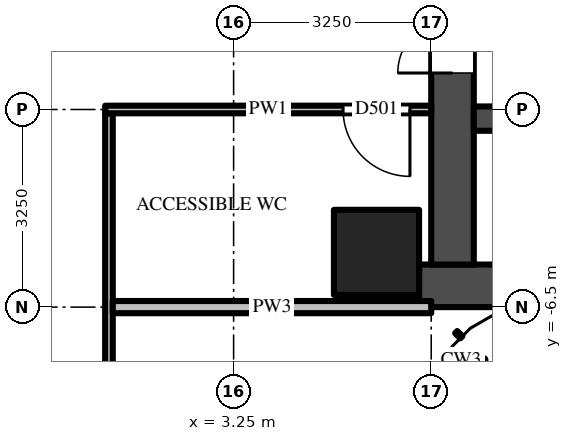
"""IFC4 building model, lengths in metres.
Left out: names, types, materials, properties, quantities, classifications, styles, units other than length and angle.
Written with IfcOpenShell. Run it as: python <this file> out.ifc"""

import sys

from ifc_helpers import new_model, si_unit, direction, frame, frame_2d, origin, origin_2d, place, context, subcontext, project, spatial, rectangle, extrude, source, transform, mapped, element, fill, save


model = new_model("IFC4")
c1 = context("Model", 3, precision=1e-05, world=origin(), true_north=direction((0.0, 1.0)))
c2 = subcontext(c1, "Body", "Model", "MODEL_VIEW")
j1 = project(units=[si_unit("LENGTHUNIT", "METRE"), si_unit("PLANEANGLEUNIT", "RADIAN")], contexts=[c1])
p1 = place(None, origin())
s1 = spatial("IfcSite", under=j1, at=p1, CompositionType="ELEMENT")
p2 = place(p1, origin())
s2 = spatial("IfcBuilding", under=s1, at=p2, CompositionType="ELEMENT")
p3 = place(p2, frame((0.0, 0.0, 83.5)))
s3 = spatial("IfcBuildingStorey", under=s2, at=p3, CompositionType="ELEMENT", Elevation=83.5)
m1 = source(origin(), c2, "Body", "SweptSolid", [
    extrude(rectangle(XDim=1.4, YDim=1.4, at=origin_2d()), origin(), (0.0, 0.0, 1.0), 4.5),
])
p4 = place(p3, frame((5.6, -5.6, 0.0), z_axis=(0.0, 0.0, 1.0), x_axis=(1.0, 0.0, 0.0)))
e1 = element("IfcColumn", 1, at=p4, inside=s3, PredefinedType="COLUMN", context=c2, shape_type="MappedRepresentation", body=[
    mapped(m1, transform((0.0, 0.0, 0.0))),
])
m2 = source(origin(), c2, "Body", "SweptSolid", [
    extrude(rectangle(XDim=16.45, YDim=0.7, at=frame_2d((8.225, 0.0))), origin(), (0.0, 0.0, 1.0), 4.25),
])
p5 = place(p3, frame((6.3, -6.15, 0.0), z_axis=(0.0, 0.0, 1.0), x_axis=(1.0, 0.0, 0.0)))
e2 = element("IfcWall", 2, at=p5, inside=s3, PredefinedType="SHEAR", context=c2, shape_type="MappedRepresentation", body=[
    mapped(m2, transform((0.0, 0.0, 0.0))),
])
m3 = source(origin(), c2, "Body", "SweptSolid", [
    extrude(rectangle(XDim=9.05, YDim=0.7, at=frame_2d((4.525, 0.0))), origin(), (0.0, 0.0, 1.0), 4.25),
])
p6 = place(p3, frame((6.85, -5.8, 0.0), z_axis=(0.0, 0.0, 1.0), x_axis=(0.0, 1.0, 0.0)))
e3 = element("IfcWall", 3, at=p6, inside=s3, PredefinedType="SHEAR", context=c2, shape_type="MappedRepresentation", body=[
    mapped(m3, transform((0.0, 0.0, 0.0))),
])
m4 = source(origin(), c2, "Body", "SweptSolid", [
    extrude(rectangle(XDim=1.8, YDim=2.1, at=frame_2d((0.9, 1.05))), frame((0.0, 0.36, 0.0), z_axis=(0.0, -1.0, 0.0), x_axis=(1.0, 0.0, 0.0)), (0.0, 0.0, 1.0), 0.72),
])
p7 = place(p6, frame((3.15, 0.0, 0.0)))
e4 = element("IfcOpeningElement", 4, at=p7, cuts=e3, PredefinedType="OPENING", context=c2, shape_type="MappedRepresentation", body=[
    mapped(m4, transform((0.0, 0.0, 0.0))),
])
m5 = source(origin(), c2, "Body", "SweptSolid", [
    extrude(rectangle(XDim=7.5, YDim=0.4, at=frame_2d((3.75, 0.0))), origin(), (0.0, 0.0, 1.0), 4.25),
])
p8 = place(p3, frame((7.2, -3.4, 0.0), z_axis=(0.0, 0.0, 1.0), x_axis=(1.0, 0.0, 0.0)))
e5 = element("IfcWall", 5, at=p8, inside=s3, PredefinedType="SHEAR", context=c2, shape_type="MappedRepresentation", body=[
    mapped(m5, transform((0.0, 0.0, 0.0))),
])
m6 = source(origin(), c2, "Body", "SweptSolid", [
    extrude(rectangle(XDim=1.1, YDim=2.1, at=frame_2d((0.55, 1.05))), frame((0.0, 0.21, 0.0), z_axis=(0.0, -1.0, 0.0), x_axis=(1.0, 0.0, 0.0)), (0.0, 0.0, 1.0), 0.42),
])
p9 = place(p8, frame((3.0, 0.0, 0.0)))
e6 = element("IfcOpeningElement", 6, at=p9, cuts=e5, PredefinedType="OPENING", context=c2, shape_type="MappedRepresentation", body=[
    mapped(m6, transform((0.0, 0.0, 0.0))),
])
p10 = place(p8, frame((5.5, 0.0, 0.0)))
e7 = element("IfcOpeningElement", 7, at=p10, cuts=e5, PredefinedType="OPENING", context=c2, shape_type="MappedRepresentation", body=[
    mapped(m6, transform((0.0, 0.0, 0.0))),
])
m7 = source(origin(), c2, "Body", "SweptSolid", [
    extrude(rectangle(XDim=8.725, YDim=0.125, at=frame_2d((4.363, 0.0))), origin(), (0.0, 0.0, 1.0), 3.468),
])
p11 = place(p3, frame((1.2, -3.312, 0.0), z_axis=(0.0, 0.0, 1.0), x_axis=(0.0, -1.0, 0.0)))
e8 = element("IfcWall", 8, at=p11, inside=s3, PredefinedType="PARTITIONING", context=c2, shape_type="MappedRepresentation", body=[
    mapped(m7, transform((0.0, 0.0, 0.0))),
])
m8 = source(origin(), c2, "Body", "SweptSolid", [
    extrude(rectangle(XDim=1.0, YDim=2.1, at=frame_2d((0.5, 1.05))), frame((0.0, 0.073, 0.0), z_axis=(0.0, -1.0, 0.0), x_axis=(1.0, 0.0, 0.0)), (0.0, 0.0, 1.0), 0.145),
])
p12 = place(p11, frame((7.438, 0.0, 0.0)))
e9 = element("IfcOpeningElement", 9, at=p12, cuts=e8, PredefinedType="OPENING", context=c2, shape_type="MappedRepresentation", body=[
    mapped(m8, transform((0.0, 0.0, 0.0))),
])
m9 = source(origin(), c2, "Body", "SweptSolid", [
    extrude(rectangle(XDim=5.238, YDim=0.2, at=frame_2d((2.619, 0.0))), origin(), (0.0, 0.0, 1.0), 3.33),
])
p13 = place(p3, frame((1.262, -6.5, 0.0), z_axis=(0.0, 0.0, 1.0), x_axis=(1.0, 0.0, 0.0)))
e10 = element("IfcWall", 10, at=p13, inside=s3, PredefinedType="PARTITIONING", context=c2, shape_type="MappedRepresentation", body=[
    mapped(m9, transform((0.0, 0.0, 0.0))),
])
m10 = source(origin(), c2, "Body", "SweptSolid", [
    extrude(rectangle(XDim=5.363, YDim=0.125, at=frame_2d((2.681, 0.0))), origin(), (0.0, 0.0, 1.0), 3.468),
])
p14 = place(p3, frame((6.5, -3.25, 0.0), z_axis=(0.0, 0.0, 1.0), x_axis=(-1.0, 0.0, 0.0)))
e11 = element("IfcWall", 11, at=p14, inside=s3, PredefinedType="PARTITIONING", context=c2, shape_type="MappedRepresentation", body=[
    mapped(m10, transform((0.0, 0.0, 0.0))),
])
m11 = source(origin(), c2, "Body", "SweptSolid", [
    extrude(rectangle(XDim=1.1, YDim=2.1, at=frame_2d((0.55, 1.05))), frame((0.0, 0.073, 0.0), z_axis=(0.0, -1.0, 0.0), x_axis=(1.0, 0.0, 0.0)), (0.0, 0.0, 1.0), 0.145),
])
p15 = place(p14, frame((0.35, 0.0, 0.0)))
e12 = element("IfcOpeningElement", 12, at=p15, cuts=e11, PredefinedType="OPENING", context=c2, shape_type="MappedRepresentation", body=[
    mapped(m11, transform((0.0, 0.0, 0.0))),
])
m12 = source(origin(), c2, "Body", "SweptSolid", [
    extrude(rectangle(XDim=1.8, YDim=2.1, at=frame_2d((0.9, 1.05))), frame((0.0, -0.275, 0.0), z_axis=(0.0, -1.0, 0.0), x_axis=(1.0, 0.0, 0.0)), (0.0, 0.0, 1.0), 0.05),
])
p16 = place(p7, origin())
e13 = element("IfcDoor", 13, at=p16, inside=s3, OperationType="DOUBLE_DOOR_SINGLE_SWING", PredefinedType="DOOR", context=c2, shape_type="MappedRepresentation", body=[
    mapped(m12, transform((0.0, 0.0, 0.0))),
])
fill(e4, e13)
m13 = source(origin(), c2, "Body", "SweptSolid", [
    extrude(rectangle(XDim=1.1, YDim=2.1, at=frame_2d((0.55, 1.05))), frame((0.0, 0.025, 0.0), z_axis=(0.0, -1.0, 0.0), x_axis=(1.0, 0.0, 0.0)), (0.0, 0.0, 1.0), 0.05),
])
p17 = place(p15, origin())
e14 = element("IfcDoor", 14, at=p17, inside=s3, OperationType="SINGLE_SWING_LEFT", PredefinedType="DOOR", context=c2, shape_type="MappedRepresentation", body=[
    mapped(m13, transform((0.0, 0.0, 0.0))),
])
fill(e12, e14)
save(model, sys.argv[1])
